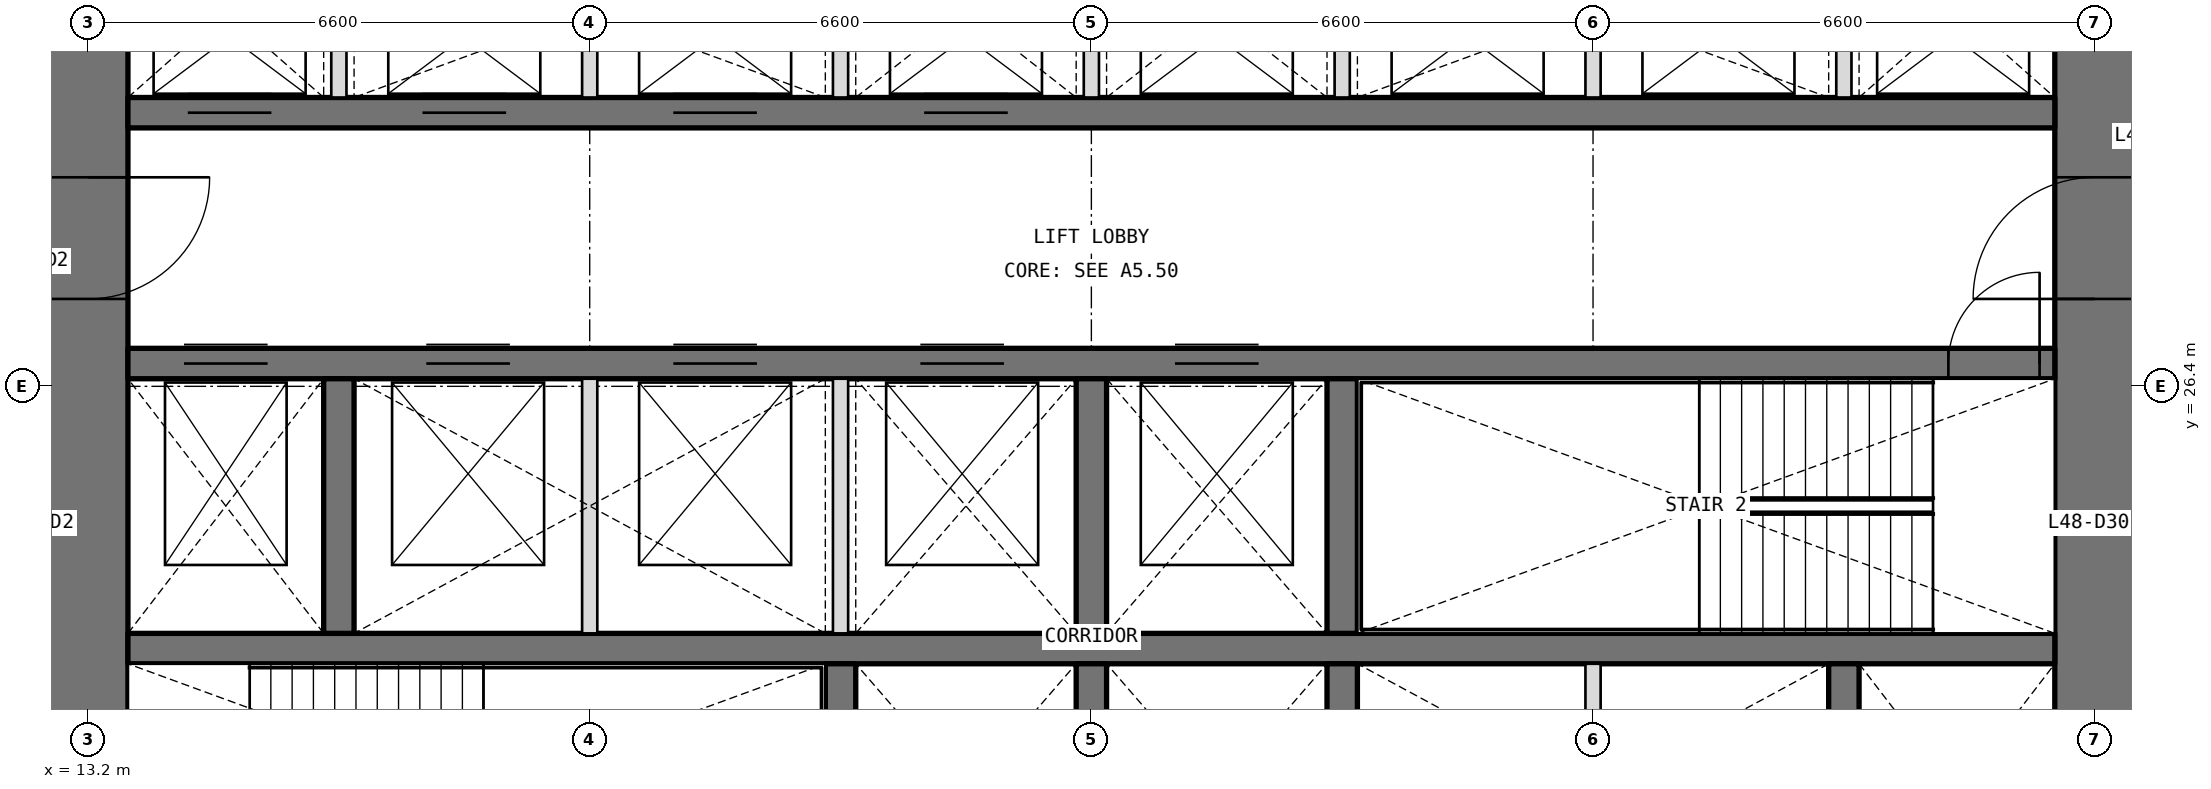
"""IFC4 building model, lengths in metres.
Left out: names, types, materials, properties, quantities, classifications, styles, units other than length and angle.
Written with IfcOpenShell. Run it as: python <this file> out.ifc"""

import sys

from ifc_helpers import new_model, si_unit, direction, frame, frame_2d, origin, place, context, subcontext, project, spatial, rectangle, extrude, element, fill, save


model = new_model("IFC4")
c1 = context("Model", 3, precision=1e-05, world=origin(), true_north=direction((0.0, 1.0)))
c2 = subcontext(c1, "Body", "Model", "MODEL_VIEW")
j1 = project(units=[si_unit("LENGTHUNIT", "METRE"), si_unit("PLANEANGLEUNIT", "RADIAN")], contexts=[c1])
p1 = place(None, origin())
s1 = spatial("IfcSite", under=j1, at=p1, CompositionType="ELEMENT")
p2 = place(p1, origin())
s2 = spatial("IfcBuilding", under=s1, at=p2, CompositionType="ELEMENT")
p3 = place(p2, frame((0.0, 0.0, 210.3)))
s3 = spatial("IfcBuildingStorey", under=s2, at=p3, CompositionType="ELEMENT", Elevation=210.3)
p4 = place(p3, frame((39.6, 13.725, 0.0), z_axis=(0.0, 0.0, 1.0), x_axis=(0.0, 1.0, 0.0)))
e1 = element("IfcWall", 1, at=p4, inside=s3, PredefinedType="SHEAR", context=c2, shape_type="SweptSolid", body=[
    extrude(rectangle(XDim=18.75, YDim=1.05, at=frame_2d((9.375, 0.0))), origin(), (0.0, 0.0, 1.0), 4.2),
])
p5 = place(p4, frame((3.025, 0.0, 0.0)))
e2 = element("IfcOpeningElement", 2, at=p5, cuts=e1, PredefinedType="OPENING", context=c2, shape_type="SweptSolid", body=[
    extrude(rectangle(XDim=1.6, YDim=2.1, at=frame_2d((0.8, 1.05))), frame((0.0, 0.535, 0.0), z_axis=(0.0, -1.0, 0.0), x_axis=(1.0, 0.0, 0.0)), (0.0, 0.0, 1.0), 1.07),
])
p6 = place(p4, frame((13.825, 0.0, 0.0)))
e3 = element("IfcOpeningElement", 3, at=p6, cuts=e1, PredefinedType="OPENING", context=c2, shape_type="SweptSolid", body=[
    extrude(rectangle(XDim=1.6, YDim=2.1, at=frame_2d((0.8, 1.05))), frame((0.0, 0.535, 0.0), z_axis=(0.0, -1.0, 0.0), x_axis=(1.0, 0.0, 0.0)), (0.0, 0.0, 1.0), 1.07),
])
p7 = place(p3, frame((13.2, 32.475, 0.0), z_axis=(0.0, 0.0, 1.0), x_axis=(0.0, -1.0, 0.0)))
e4 = element("IfcWall", 4, at=p7, inside=s3, PredefinedType="SHEAR", context=c2, shape_type="SweptSolid", body=[
    extrude(rectangle(XDim=18.75, YDim=1.05, at=frame_2d((9.375, 0.0))), origin(), (0.0, 0.0, 1.0), 4.2),
])
p8 = place(p7, frame((14.125, 0.0, 0.0)))
e5 = element("IfcOpeningElement", 5, at=p8, cuts=e4, PredefinedType="OPENING", context=c2, shape_type="SweptSolid", body=[
    extrude(rectangle(XDim=1.6, YDim=2.1, at=frame_2d((0.8, 1.05))), frame((0.0, 0.535, 0.0), z_axis=(0.0, -1.0, 0.0), x_axis=(1.0, 0.0, 0.0)), (0.0, 0.0, 1.0), 1.07),
])
p9 = place(p7, frame((3.325, 0.0, 0.0)))
e6 = element("IfcOpeningElement", 6, at=p9, cuts=e4, PredefinedType="OPENING", context=c2, shape_type="SweptSolid", body=[
    extrude(rectangle(XDim=1.6, YDim=2.1, at=frame_2d((0.8, 1.05))), frame((0.0, 0.535, 0.0), z_axis=(0.0, -1.0, 0.0), x_axis=(1.0, 0.0, 0.0)), (0.0, 0.0, 1.0), 1.07),
])
p10 = place(p3, frame((13.725, 22.95, 0.0), z_axis=(0.0, 0.0, 1.0), x_axis=(1.0, 0.0, 0.0)))
e7 = element("IfcWall", 7, at=p10, inside=s3, PredefinedType="SHEAR", context=c2, shape_type="SweptSolid", body=[
    extrude(rectangle(XDim=25.35, YDim=0.4, at=frame_2d((12.675, 0.0))), origin(), (0.0, 0.0, 1.0), 4.2),
])
p11 = place(p3, frame((13.725, 26.7, 0.0), z_axis=(0.0, 0.0, 1.0), x_axis=(1.0, 0.0, 0.0)))
e8 = element("IfcWall", 8, at=p11, inside=s3, PredefinedType="SHEAR", context=c2, shape_type="SweptSolid", body=[
    extrude(rectangle(XDim=25.35, YDim=0.4, at=frame_2d((12.675, 0.0))), origin(), (0.0, 0.0, 1.0), 4.2),
])
p12 = place(p11, frame((23.95, 0.0, 0.0)))
e9 = element("IfcOpeningElement", 9, at=p12, cuts=e8, PredefinedType="OPENING", context=c2, shape_type="SweptSolid", body=[
    extrude(rectangle(XDim=1.2, YDim=2.1, at=frame_2d((0.6, 1.05))), frame((0.0, 0.21, 0.0), z_axis=(0.0, -1.0, 0.0), x_axis=(1.0, 0.0, 0.0)), (0.0, 0.0, 1.0), 0.42),
])
p13 = place(p11, frame((0.738, 0.0, 0.0)))
e10 = element("IfcOpeningElement", 10, at=p13, cuts=e8, PredefinedType="OPENING", context=c2, shape_type="SweptSolid", body=[
    extrude(rectangle(XDim=1.1, YDim=2.1, at=frame_2d((0.55, 1.05))), frame((0.0, 0.21, 0.0), z_axis=(0.0, -1.0, 0.0), x_axis=(1.0, 0.0, 0.0)), (0.0, 0.0, 1.0), 0.42),
])
p14 = place(p11, frame((3.925, 0.0, 0.0)))
e11 = element("IfcOpeningElement", 11, at=p14, cuts=e8, PredefinedType="OPENING", context=c2, shape_type="SweptSolid", body=[
    extrude(rectangle(XDim=1.1, YDim=2.1, at=frame_2d((0.55, 1.05))), frame((0.0, 0.21, 0.0), z_axis=(0.0, -1.0, 0.0), x_axis=(1.0, 0.0, 0.0)), (0.0, 0.0, 1.0), 0.42),
])
p15 = place(p11, frame((7.175, 0.0, 0.0)))
e12 = element("IfcOpeningElement", 12, at=p15, cuts=e8, PredefinedType="OPENING", context=c2, shape_type="SweptSolid", body=[
    extrude(rectangle(XDim=1.1, YDim=2.1, at=frame_2d((0.55, 1.05))), frame((0.0, 0.21, 0.0), z_axis=(0.0, -1.0, 0.0), x_axis=(1.0, 0.0, 0.0)), (0.0, 0.0, 1.0), 0.42),
])
p16 = place(p11, frame((10.425, 0.0, 0.0)))
e13 = element("IfcOpeningElement", 13, at=p16, cuts=e8, PredefinedType="OPENING", context=c2, shape_type="SweptSolid", body=[
    extrude(rectangle(XDim=1.1, YDim=2.1, at=frame_2d((0.55, 1.05))), frame((0.0, 0.21, 0.0), z_axis=(0.0, -1.0, 0.0), x_axis=(1.0, 0.0, 0.0)), (0.0, 0.0, 1.0), 0.42),
])
p17 = place(p11, frame((13.775, 0.0, 0.0)))
e14 = element("IfcOpeningElement", 14, at=p17, cuts=e8, PredefinedType="OPENING", context=c2, shape_type="SweptSolid", body=[
    extrude(rectangle(XDim=1.1, YDim=2.1, at=frame_2d((0.55, 1.05))), frame((0.0, 0.21, 0.0), z_axis=(0.0, -1.0, 0.0), x_axis=(1.0, 0.0, 0.0)), (0.0, 0.0, 1.0), 0.42),
])
p18 = place(p3, frame((13.725, 30.0, 0.0), z_axis=(0.0, 0.0, 1.0), x_axis=(1.0, 0.0, 0.0)))
e15 = element("IfcWall", 15, at=p18, inside=s3, PredefinedType="SHEAR", context=c2, shape_type="SweptSolid", body=[
    extrude(rectangle(XDim=25.35, YDim=0.4, at=frame_2d((12.675, 0.0))), origin(), (0.0, 0.0, 1.0), 4.2),
])
p19 = place(p18, frame((0.788, 0.0, 0.0)))
e16 = element("IfcOpeningElement", 16, at=p19, cuts=e15, PredefinedType="OPENING", context=c2, shape_type="SweptSolid", body=[
    extrude(rectangle(XDim=1.1, YDim=2.1, at=frame_2d((0.55, 1.05))), frame((0.0, 0.21, 0.0), z_axis=(0.0, -1.0, 0.0), x_axis=(1.0, 0.0, 0.0)), (0.0, 0.0, 1.0), 0.42),
])
p20 = place(p18, frame((3.875, 0.0, 0.0)))
e17 = element("IfcOpeningElement", 17, at=p20, cuts=e15, PredefinedType="OPENING", context=c2, shape_type="SweptSolid", body=[
    extrude(rectangle(XDim=1.1, YDim=2.1, at=frame_2d((0.55, 1.05))), frame((0.0, 0.21, 0.0), z_axis=(0.0, -1.0, 0.0), x_axis=(1.0, 0.0, 0.0)), (0.0, 0.0, 1.0), 0.42),
])
p21 = place(p18, frame((7.175, 0.0, 0.0)))
e18 = element("IfcOpeningElement", 18, at=p21, cuts=e15, PredefinedType="OPENING", context=c2, shape_type="SweptSolid", body=[
    extrude(rectangle(XDim=1.1, YDim=2.1, at=frame_2d((0.55, 1.05))), frame((0.0, 0.21, 0.0), z_axis=(0.0, -1.0, 0.0), x_axis=(1.0, 0.0, 0.0)), (0.0, 0.0, 1.0), 0.42),
])
p22 = place(p18, frame((10.475, 0.0, 0.0)))
e19 = element("IfcOpeningElement", 19, at=p22, cuts=e15, PredefinedType="OPENING", context=c2, shape_type="SweptSolid", body=[
    extrude(rectangle(XDim=1.1, YDim=2.1, at=frame_2d((0.55, 1.05))), frame((0.0, 0.21, 0.0), z_axis=(0.0, -1.0, 0.0), x_axis=(1.0, 0.0, 0.0)), (0.0, 0.0, 1.0), 0.42),
])
for number, where, z_axis, x_axis in (
    (20, (23.1, 19.4, 0.0), (0.0, 0.0, 1.0), (0.0, 1.0, 0.0)),
    (21, (26.4, 19.4, 0.0), (0.0, 0.0, 1.0), (0.0, 1.0, 0.0)),
    (22, (29.7, 19.4, 0.0), (0.0, 0.0, 1.0), (0.0, 1.0, 0.0)),
    (23, (36.3, 19.4, 0.0), (0.0, 0.0, 1.0), (0.0, 1.0, 0.0)),
    (24, (16.5, 23.15, 0.0), (0.0, 0.0, 1.0), (0.0, 1.0, 0.0)),
    (25, (26.4, 23.15, 0.0), (0.0, 0.0, 1.0), (0.0, 1.0, 0.0)),
    (26, (29.7, 23.15, 0.0), (0.0, 0.0, 1.0), (0.0, 1.0, 0.0)),
):
    element("IfcWall", number, at=place(p3, frame(where, z_axis=z_axis, x_axis=x_axis)), inside=s3, PredefinedType="SHEAR", context=c2, shape_type="SweptSolid", body=[
        extrude(rectangle(XDim=3.35, YDim=0.4, at=frame_2d((1.675, 0.0))), origin(), (0.0, 0.0, 1.0), 4.2),
    ])
for number, where, z_axis, x_axis in (
    (27, (16.5, 30.2, 0.0), (0.0, 0.0, 1.0), (0.0, 1.0, 0.0)),
    (28, (19.8, 30.2, 0.0), (0.0, 0.0, 1.0), (0.0, 1.0, 0.0)),
    (29, (23.1, 30.2, 0.0), (0.0, 0.0, 1.0), (0.0, 1.0, 0.0)),
    (30, (26.4, 30.2, 0.0), (0.0, 0.0, 1.0), (0.0, 1.0, 0.0)),
    (31, (29.7, 30.2, 0.0), (0.0, 0.0, 1.0), (0.0, 1.0, 0.0)),
    (32, (33.0, 30.2, 0.0), (0.0, 0.0, 1.0), (0.0, 1.0, 0.0)),
    (33, (36.3, 30.2, 0.0), (0.0, 0.0, 1.0), (0.0, 1.0, 0.0)),
):
    element("IfcWall", number, at=place(p3, frame(where, z_axis=z_axis, x_axis=x_axis)), inside=s3, PredefinedType="PARTITIONING", context=c2, shape_type="SweptSolid", body=[
        extrude(rectangle(XDim=2.275, YDim=0.2, at=frame_2d((1.138, 0.0))), origin(), (0.0, 0.0, 1.0), 4.2),
    ])
for number, where, z_axis, x_axis in (
    (34, (33.0, 19.4, 0.0), (0.0, 0.0, 1.0), (0.0, 1.0, 0.0)),
    (35, (19.8, 23.15, 0.0), (0.0, 0.0, 1.0), (0.0, 1.0, 0.0)),
    (36, (23.1, 23.15, 0.0), (0.0, 0.0, 1.0), (0.0, 1.0, 0.0)),
):
    element("IfcWall", number, at=place(p3, frame(where, z_axis=z_axis, x_axis=x_axis)), inside=s3, PredefinedType="PARTITIONING", context=c2, shape_type="SweptSolid", body=[
        extrude(rectangle(XDim=3.35, YDim=0.2, at=frame_2d((1.675, 0.0))), origin(), (0.0, 0.0, 1.0), 4.2),
    ])
p23 = place(p12, origin())
e37 = element("IfcDoor", 37, at=p23, inside=s3, OperationType="SINGLE_SWING_RIGHT", PredefinedType="DOOR", context=c2, shape_type="SweptSolid", body=[
    extrude(rectangle(XDim=1.2, YDim=2.1, at=frame_2d((0.6, 1.05))), frame((0.0, 0.025, 0.0), z_axis=(0.0, -1.0, 0.0), x_axis=(1.0, 0.0, 0.0)), (0.0, 0.0, 1.0), 0.05),
])
fill(e9, e37)
p24 = place(p9, origin())
e38 = element("IfcDoor", 38, at=p24, inside=s3, OperationType="DOUBLE_DOOR_DOUBLE_SWING", PredefinedType="DOOR", context=c2, shape_type="SweptSolid", body=[
    extrude(rectangle(XDim=1.6, YDim=2.1, at=frame_2d((0.8, 1.05))), frame((0.0, 0.025, 0.0), z_axis=(0.0, -1.0, 0.0), x_axis=(1.0, 0.0, 0.0)), (0.0, 0.0, 1.0), 0.05),
])
fill(e6, e38)
p25 = place(p6, origin())
e39 = element("IfcDoor", 39, at=p25, inside=s3, OperationType="DOUBLE_DOOR_DOUBLE_SWING", PredefinedType="DOOR", context=c2, shape_type="SweptSolid", body=[
    extrude(rectangle(XDim=1.6, YDim=2.1, at=frame_2d((0.8, 1.05))), frame((0.0, 0.025, 0.0), z_axis=(0.0, -1.0, 0.0), x_axis=(1.0, 0.0, 0.0)), (0.0, 0.0, 1.0), 0.05),
])
fill(e3, e39)
p26 = place(p19, origin())
e40 = element("IfcDoor", 40, at=p26, inside=s3, OperationType="DOUBLE_DOOR_SLIDING", PredefinedType="DOOR", context=c2, shape_type="SweptSolid", body=[
    extrude(rectangle(XDim=1.1, YDim=2.1, at=frame_2d((0.55, 1.05))), frame((0.0, 0.025, 0.0), z_axis=(0.0, -1.0, 0.0), x_axis=(1.0, 0.0, 0.0)), (0.0, 0.0, 1.0), 0.05),
])
fill(e16, e40)
p27 = place(p20, origin())
e41 = element("IfcDoor", 41, at=p27, inside=s3, OperationType="DOUBLE_DOOR_SLIDING", PredefinedType="DOOR", context=c2, shape_type="SweptSolid", body=[
    extrude(rectangle(XDim=1.1, YDim=2.1, at=frame_2d((0.55, 1.05))), frame((0.0, 0.025, 0.0), z_axis=(0.0, -1.0, 0.0), x_axis=(1.0, 0.0, 0.0)), (0.0, 0.0, 1.0), 0.05),
])
fill(e17, e41)
p28 = place(p21, origin())
e42 = element("IfcDoor", 42, at=p28, inside=s3, OperationType="DOUBLE_DOOR_SLIDING", PredefinedType="DOOR", context=c2, shape_type="SweptSolid", body=[
    extrude(rectangle(XDim=1.1, YDim=2.1, at=frame_2d((0.55, 1.05))), frame((0.0, 0.025, 0.0), z_axis=(0.0, -1.0, 0.0), x_axis=(1.0, 0.0, 0.0)), (0.0, 0.0, 1.0), 0.05),
])
fill(e18, e42)
p29 = place(p22, origin())
e43 = element("IfcDoor", 43, at=p29, inside=s3, OperationType="DOUBLE_DOOR_SLIDING", PredefinedType="DOOR", context=c2, shape_type="SweptSolid", body=[
    extrude(rectangle(XDim=1.1, YDim=2.1, at=frame_2d((0.55, 1.05))), frame((0.0, 0.025, 0.0), z_axis=(0.0, -1.0, 0.0), x_axis=(1.0, 0.0, 0.0)), (0.0, 0.0, 1.0), 0.05),
])
fill(e19, e43)
p30 = place(p13, origin())
e44 = element("IfcDoor", 44, at=p30, inside=s3, OperationType="DOUBLE_DOOR_SLIDING", PredefinedType="DOOR", context=c2, shape_type="SweptSolid", body=[
    extrude(rectangle(XDim=1.1, YDim=2.1, at=frame_2d((0.55, 1.05))), frame((0.0, 0.025, 0.0), z_axis=(0.0, -1.0, 0.0), x_axis=(1.0, 0.0, 0.0)), (0.0, 0.0, 1.0), 0.05),
])
fill(e10, e44)
p31 = place(p14, origin())
e45 = element("IfcDoor", 45, at=p31, inside=s3, OperationType="DOUBLE_DOOR_SLIDING", PredefinedType="DOOR", context=c2, shape_type="SweptSolid", body=[
    extrude(rectangle(XDim=1.1, YDim=2.1, at=frame_2d((0.55, 1.05))), frame((0.0, 0.025, 0.0), z_axis=(0.0, -1.0, 0.0), x_axis=(1.0, 0.0, 0.0)), (0.0, 0.0, 1.0), 0.05),
])
fill(e11, e45)
p32 = place(p15, origin())
e46 = element("IfcDoor", 46, at=p32, inside=s3, OperationType="DOUBLE_DOOR_SLIDING", PredefinedType="DOOR", context=c2, shape_type="SweptSolid", body=[
    extrude(rectangle(XDim=1.1, YDim=2.1, at=frame_2d((0.55, 1.05))), frame((0.0, 0.025, 0.0), z_axis=(0.0, -1.0, 0.0), x_axis=(1.0, 0.0, 0.0)), (0.0, 0.0, 1.0), 0.05),
])
fill(e12, e46)
p33 = place(p16, origin())
e47 = element("IfcDoor", 47, at=p33, inside=s3, OperationType="DOUBLE_DOOR_SLIDING", PredefinedType="DOOR", context=c2, shape_type="SweptSolid", body=[
    extrude(rectangle(XDim=1.1, YDim=2.1, at=frame_2d((0.55, 1.05))), frame((0.0, 0.025, 0.0), z_axis=(0.0, -1.0, 0.0), x_axis=(1.0, 0.0, 0.0)), (0.0, 0.0, 1.0), 0.05),
])
fill(e13, e47)
p34 = place(p17, origin())
e48 = element("IfcDoor", 48, at=p34, inside=s3, OperationType="DOUBLE_DOOR_SLIDING", PredefinedType="DOOR", context=c2, shape_type="SweptSolid", body=[
    extrude(rectangle(XDim=1.1, YDim=2.1, at=frame_2d((0.55, 1.05))), frame((0.0, 0.025, 0.0), z_axis=(0.0, -1.0, 0.0), x_axis=(1.0, 0.0, 0.0)), (0.0, 0.0, 1.0), 0.05),
])
fill(e14, e48)
save(model, sys.argv[1])
